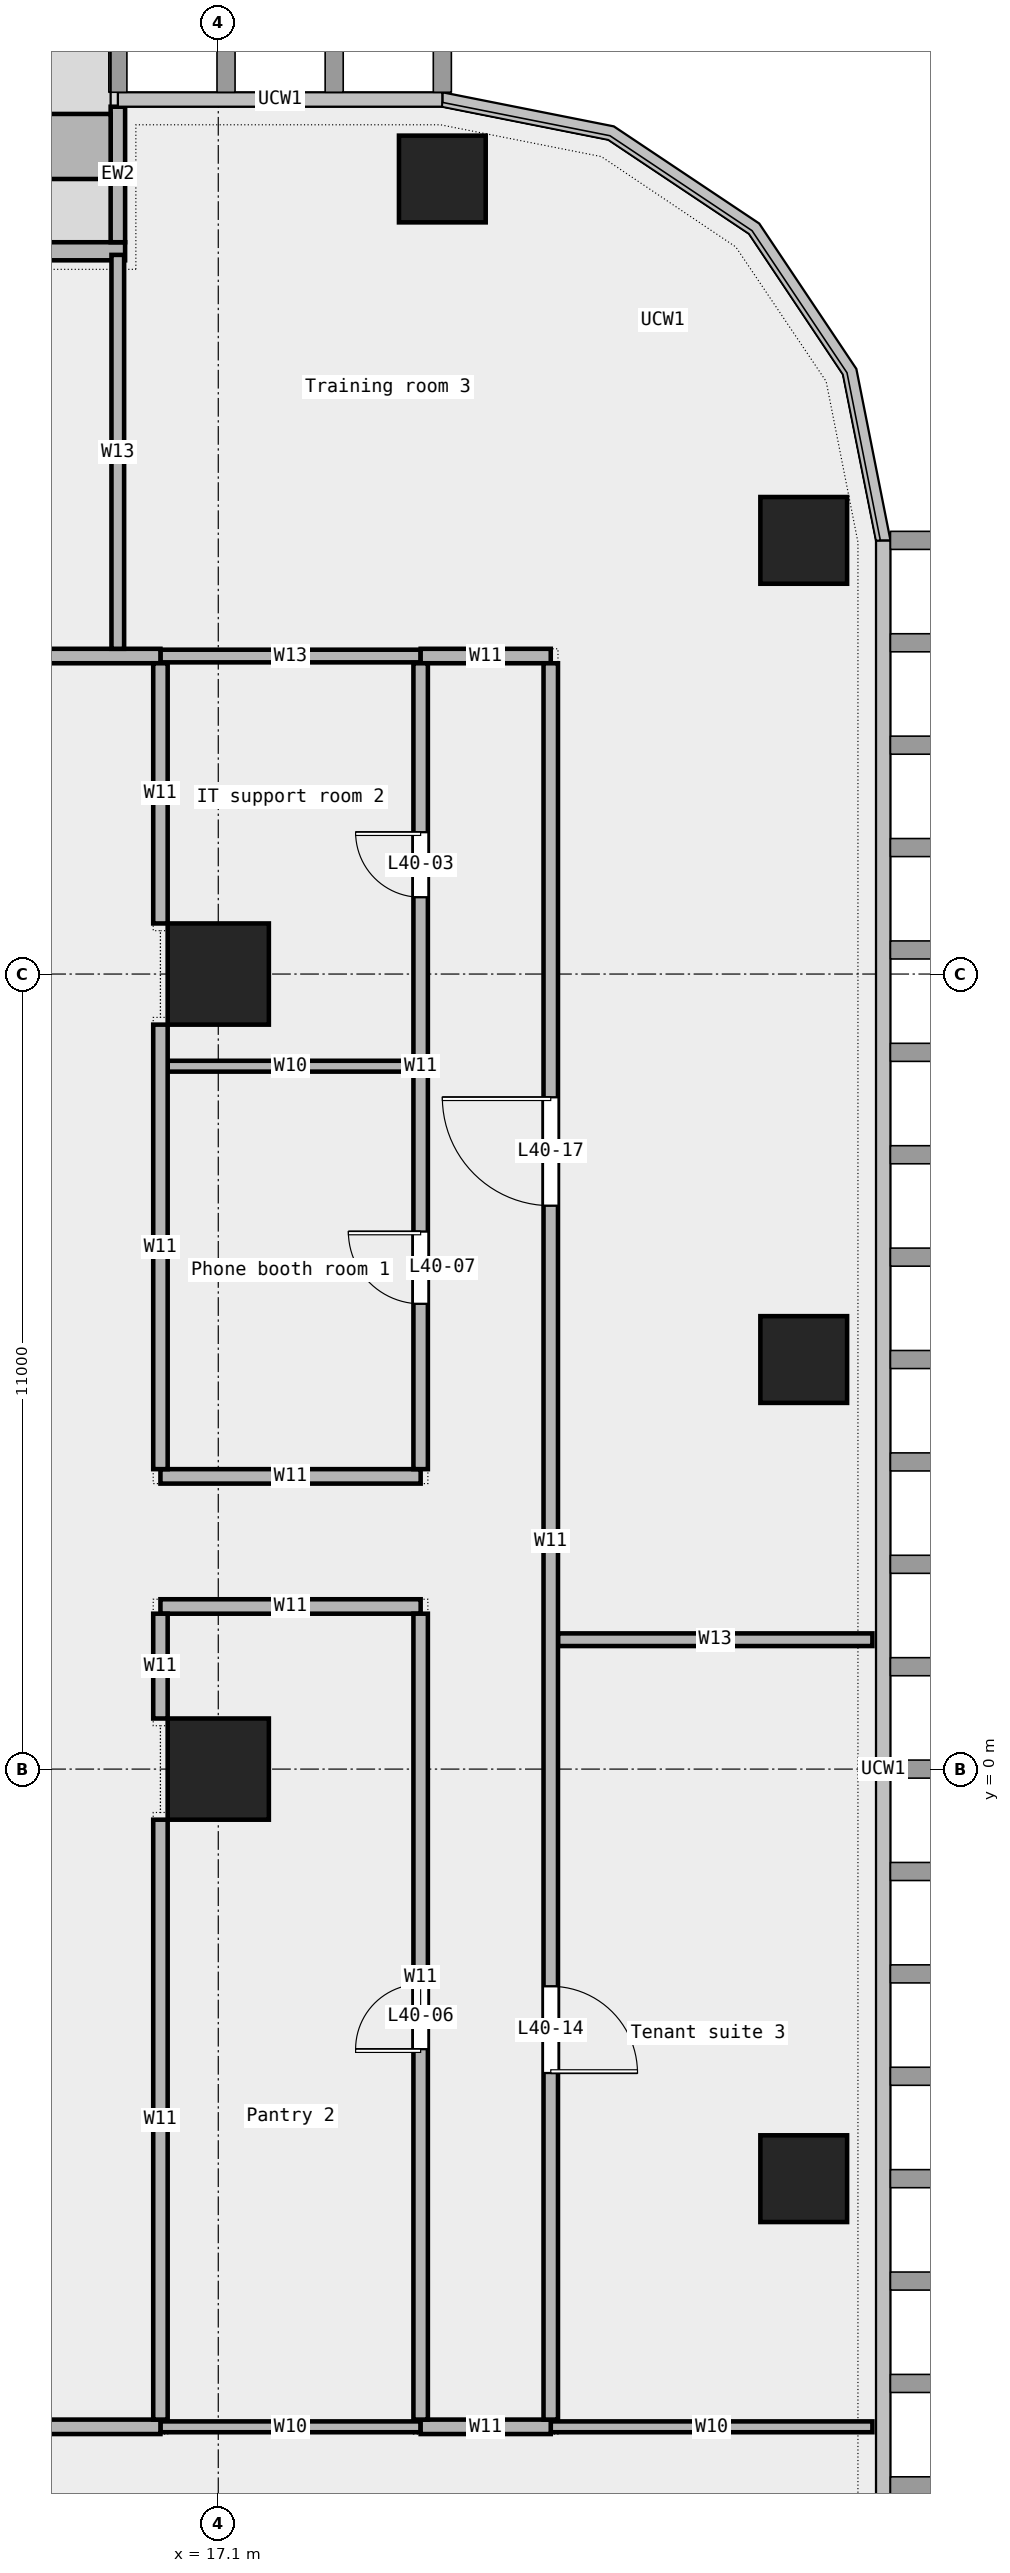
"""IFC4 building model, lengths in metres.
Left out: names, types, materials, properties, quantities, classifications, styles, units other than length and angle.
Written with IfcOpenShell. Run it as: python <this file> out.ifc"""

import sys

from ifc_helpers import new_model, si_unit, direction, frame, frame_2d, origin, origin_2d, place, context, subcontext, project, spatial, rectangle, extrude, element, fill, save


model = new_model("IFC4")
c1 = context("Model", 3, precision=1e-05, world=origin(), true_north=direction((0.0, 1.0)))
c2 = subcontext(c1, "Body", "Model", "MODEL_VIEW")
j1 = project(units=[si_unit("LENGTHUNIT", "METRE"), si_unit("PLANEANGLEUNIT", "RADIAN")], contexts=[c1])
p1 = place(None, origin())
s1 = spatial("IfcSite", under=j1, at=p1, CompositionType="ELEMENT")
p2 = place(p1, origin())
s2 = spatial("IfcBuilding", under=s1, at=p2, CompositionType="ELEMENT")
p3 = place(p2, frame((0.0, 0.0, 193.0)))
s3 = spatial("IfcBuildingStorey", under=s2, at=p3, CompositionType="ELEMENT", Elevation=193.0)
for number, where, z_axis, x_axis in (
    (1, (25.2, -5.667, 0.0), (0.0, 0.0, 1.0), (1.0, 0.0, 0.0)),
    (2, (25.2, 5.667, 0.0), (0.0, 0.0, 1.0), (1.0, 0.0, 0.0)),
    (3, (25.2, 17.0, 0.0), (0.0, 0.0, 1.0), (1.0, 0.0, 0.0)),
    (4, (20.2, 22.0, 0.0), (0.0, 0.0, 1.0), (1.0, 0.0, 0.0)),
):
    element("IfcColumn", number, at=place(p3, frame(where, z_axis=z_axis, x_axis=x_axis)), inside=s3, PredefinedType="COLUMN", context=c2, shape_type="SweptSolid", body=[
        extrude(rectangle(XDim=1.2, YDim=1.2, at=origin_2d()), origin(), (0.0, 0.0, 1.0), 3.6),
    ])
for number, where, z_axis, x_axis in (
    (5, (17.1, 0.0, 0.0), (0.0, 0.0, 1.0), (1.0, 0.0, 0.0)),
    (6, (17.1, 11.0, 0.0), (0.0, 0.0, 1.0), (1.0, 0.0, 0.0)),
):
    element("IfcColumn", number, at=place(p3, frame(where, z_axis=z_axis, x_axis=x_axis)), inside=s3, PredefinedType="COLUMN", context=c2, shape_type="SweptSolid", body=[
        extrude(rectangle(XDim=1.4, YDim=1.4, at=origin_2d()), origin(), (0.0, 0.0, 1.0), 3.6),
    ])
p4 = place(p3, frame((15.811, 21.0, 0.0), z_axis=(0.0, 0.0, 1.0), x_axis=(-1.0, 0.0, 0.0)))
e7 = element("IfcWall", 7, at=p4, inside=s3, PredefinedType="STANDARD", context=c2, shape_type="SweptSolid", body=[
    extrude(rectangle(XDim=13.667, YDim=0.25, at=frame_2d((6.833, 0.0))), origin(), (0.0, 0.0, 1.0), 3.6),
])
p5 = place(p4, frame((1.75, 0.0, 0.45)))
e8 = element("IfcOpeningElement", 8, at=p5, cuts=e7, PredefinedType="OPENING", context=c2, shape_type="SweptSolid", body=[
    extrude(rectangle(XDim=1.5, YDim=2.4, at=frame_2d((0.75, 1.2))), frame((0.0, 0.137, 0.0), z_axis=(0.0, -1.0, 0.0), x_axis=(1.0, 0.0, 0.0)), (0.0, 0.0, 1.0), 0.274),
])
p6 = place(p4, frame((6.75, 0.0, 0.0)))
e9 = element("IfcOpeningElement", 9, at=p6, cuts=e7, PredefinedType="OPENING", context=c2, shape_type="SweptSolid", body=[
    extrude(rectangle(XDim=1.8, YDim=2.4, at=frame_2d((0.9, 1.2))), frame((0.0, 0.137, 0.0), z_axis=(0.0, -1.0, 0.0), x_axis=(1.0, 0.0, 0.0)), (0.0, 0.0, 1.0), 0.274),
])
p7 = place(p4, frame((10.5, 0.0, 0.45)))
e10 = element("IfcOpeningElement", 10, at=p7, cuts=e7, PredefinedType="OPENING", context=c2, shape_type="SweptSolid", body=[
    extrude(rectangle(XDim=1.5, YDim=2.4, at=frame_2d((0.75, 1.2))), frame((0.0, 0.137, 0.0), z_axis=(0.0, -1.0, 0.0), x_axis=(1.0, 0.0, 0.0)), (0.0, 0.0, 1.0), 0.274),
])
p8 = place(p3, frame((15.711, 23.0, 0.0), z_axis=(0.0, 0.0, 1.0), x_axis=(0.0, -1.0, 0.0)))
e11 = element("IfcWall", 11, at=p8, inside=s3, PredefinedType="STANDARD", context=c2, shape_type="SweptSolid", body=[
    extrude(rectangle(XDim=1.875, YDim=0.2, at=frame_2d((0.938, 0.0))), origin(), (0.0, 0.0, 1.0), 3.6),
])
p9 = place(p3, frame((15.611, 22.45, 0.0), z_axis=(0.0, 0.0, 1.0), x_axis=(-1.0, 0.0, 0.0)))
e12 = element("IfcWall", 12, at=p9, inside=s3, PredefinedType="STANDARD", context=c2, shape_type="SweptSolid", body=[
    extrude(rectangle(XDim=3.6, YDim=0.9, at=frame_2d((1.8, 0.0))), origin(), (0.0, 0.0, 1.0), 0.7),
])
p10 = place(p3, frame((16.3, -9.1, 0.0), z_axis=(0.0, 0.0, 1.0), x_axis=(1.0, 0.0, 0.0)))
e13 = element("IfcWall", 13, at=p10, inside=s3, PredefinedType="PARTITIONING", context=c2, shape_type="SweptSolid", body=[
    extrude(rectangle(XDim=3.6, YDim=0.15, at=frame_2d((1.8, 0.0))), origin(), (0.0, 0.0, 1.0), 3.6),
])
p11 = place(p3, frame((21.7, -9.1, 0.0), z_axis=(0.0, 0.0, 1.0), x_axis=(1.0, 0.0, 0.0)))
e14 = element("IfcWall", 14, at=p11, inside=s3, PredefinedType="PARTITIONING", context=c2, shape_type="SweptSolid", body=[
    extrude(rectangle(XDim=4.45, YDim=0.15, at=frame_2d((2.225, 0.0))), origin(), (0.0, 0.0, 1.0), 3.6),
])
p12 = place(p3, frame((4.84, -9.1, 0.0), z_axis=(0.0, 0.0, 1.0), x_axis=(1.0, 0.0, 0.0)))
e15 = element("IfcWall", 15, at=p12, inside=s3, PredefinedType="PARTITIONING", context=c2, shape_type="SweptSolid", body=[
    extrude(rectangle(XDim=11.46, YDim=0.2, at=frame_2d((5.73, 0.0))), origin(), (0.0, 0.0, 1.0), 3.6),
])
p13 = place(p3, frame((19.9, -9.1, 0.0), z_axis=(0.0, 0.0, 1.0), x_axis=(1.0, 0.0, 0.0)))
e16 = element("IfcWall", 16, at=p13, inside=s3, PredefinedType="PARTITIONING", context=c2, shape_type="SweptSolid", body=[
    extrude(rectangle(XDim=1.8, YDim=0.2, at=frame_2d((0.9, 0.0))), origin(), (0.0, 0.0, 1.0), 3.6),
])
p14 = place(p3, frame((21.8, 1.79, 0.0), z_axis=(0.0, 0.0, 1.0), x_axis=(1.0, 0.0, 0.0)))
e17 = element("IfcWall", 17, at=p14, inside=s3, PredefinedType="PARTITIONING", context=c2, shape_type="SweptSolid", body=[
    extrude(rectangle(XDim=4.35, YDim=0.175, at=frame_2d((2.175, 0.0))), origin(), (0.0, 0.0, 1.0), 3.6),
])
for number, where, z_axis, x_axis in (
    (18, (16.3, 2.25, 0.0), (0.0, 0.0, 1.0), (1.0, 0.0, 0.0)),
    (19, (16.3, 4.05, 0.0), (0.0, 0.0, 1.0), (1.0, 0.0, 0.0)),
):
    element("IfcWall", number, at=place(p3, frame(where, z_axis=z_axis, x_axis=x_axis)), inside=s3, PredefinedType="PARTITIONING", context=c2, shape_type="SweptSolid", body=[
        extrude(rectangle(XDim=3.6, YDim=0.2, at=frame_2d((1.8, 0.0))), origin(), (0.0, 0.0, 1.0), 3.6),
    ])
p15 = place(p3, frame((16.4, 9.725, 0.0), z_axis=(0.0, 0.0, 1.0), x_axis=(1.0, 0.0, 0.0)))
e20 = element("IfcWall", 20, at=p15, inside=s3, PredefinedType="PARTITIONING", context=c2, shape_type="SweptSolid", body=[
    extrude(rectangle(XDim=3.4, YDim=0.15, at=frame_2d((1.7, 0.0))), origin(), (0.0, 0.0, 1.0), 3.6),
])
p16 = place(p3, frame((16.3, 15.4, 0.0), z_axis=(0.0, 0.0, 1.0), x_axis=(1.0, 0.0, 0.0)))
e21 = element("IfcWall", 21, at=p16, inside=s3, PredefinedType="PARTITIONING", context=c2, shape_type="SweptSolid", body=[
    extrude(rectangle(XDim=3.6, YDim=0.175, at=frame_2d((1.8, 0.0))), origin(), (0.0, 0.0, 1.0), 3.6),
])
p17 = place(p3, frame((-16.3, 15.4, 0.0), z_axis=(0.0, 0.0, 1.0), x_axis=(1.0, 0.0, 0.0)))
e22 = element("IfcWall", 22, at=p17, inside=s3, PredefinedType="PARTITIONING", context=c2, shape_type="SweptSolid", body=[
    extrude(rectangle(XDim=32.6, YDim=0.2, at=frame_2d((16.3, 0.0))), origin(), (0.0, 0.0, 1.0), 3.6),
])
p18 = place(p17, frame((10.185, 0.0, 0.0)))
e23 = element("IfcOpeningElement", 23, at=p18, cuts=e22, PredefinedType="OPENING", context=c2, shape_type="SweptSolid", body=[
    extrude(rectangle(XDim=1.5, YDim=2.1, at=frame_2d((0.75, 1.05))), frame((0.0, 0.112, 0.0), z_axis=(0.0, -1.0, 0.0), x_axis=(1.0, 0.0, 0.0)), (0.0, 0.0, 1.0), 0.224),
])
p19 = place(p17, frame((1.062, 0.0, 0.0)))
e24 = element("IfcOpeningElement", 24, at=p19, cuts=e22, PredefinedType="OPENING", context=c2, shape_type="SweptSolid", body=[
    extrude(rectangle(XDim=1.2, YDim=2.1, at=frame_2d((0.6, 1.05))), frame((0.0, 0.112, 0.0), z_axis=(0.0, -1.0, 0.0), x_axis=(1.0, 0.0, 0.0)), (0.0, 0.0, 1.0), 0.224),
])
p20 = place(p17, frame((24.677, 0.0, 0.0)))
e25 = element("IfcOpeningElement", 25, at=p20, cuts=e22, PredefinedType="OPENING", context=c2, shape_type="SweptSolid", body=[
    extrude(rectangle(XDim=1.2, YDim=2.1, at=frame_2d((0.6, 1.05))), frame((0.0, 0.112, 0.0), z_axis=(0.0, -1.0, 0.0), x_axis=(1.0, 0.0, 0.0)), (0.0, 0.0, 1.0), 0.224),
])
p21 = place(p3, frame((19.9, 15.4, 0.0), z_axis=(0.0, 0.0, 1.0), x_axis=(1.0, 0.0, 0.0)))
e26 = element("IfcWall", 26, at=p21, inside=s3, PredefinedType="PARTITIONING", context=c2, shape_type="SweptSolid", body=[
    extrude(rectangle(XDim=1.8, YDim=0.2, at=frame_2d((0.9, 0.0))), origin(), (0.0, 0.0, 1.0), 3.6),
])
p22 = place(p3, frame((15.71, 15.5, 0.0), z_axis=(0.0, 0.0, 1.0), x_axis=(0.0, 1.0, 0.0)))
e27 = element("IfcWall", 27, at=p22, inside=s3, PredefinedType="PARTITIONING", context=c2, shape_type="SweptSolid", body=[
    extrude(rectangle(XDim=5.45, YDim=0.175, at=frame_2d((2.725, 0.0))), origin(), (0.0, 0.0, 1.0), 3.6),
])
p23 = place(p3, frame((16.3, -9.0, 0.0), z_axis=(0.0, 0.0, 1.0), x_axis=(0.0, 1.0, 0.0)))
e28 = element("IfcWall", 28, at=p23, inside=s3, PredefinedType="PARTITIONING", context=c2, shape_type="SweptSolid", body=[
    extrude(rectangle(XDim=8.3, YDim=0.2, at=frame_2d((4.15, 0.0))), origin(), (0.0, 0.0, 1.0), 3.6),
])
p24 = place(p3, frame((16.3, 0.7, 0.0), z_axis=(0.0, 0.0, 1.0), x_axis=(0.0, 1.0, 0.0)))
e29 = element("IfcWall", 29, at=p24, inside=s3, PredefinedType="PARTITIONING", context=c2, shape_type="SweptSolid", body=[
    extrude(rectangle(XDim=1.45, YDim=0.2, at=frame_2d((0.725, 0.0))), origin(), (0.0, 0.0, 1.0), 3.6),
])
p25 = place(p3, frame((16.3, 4.15, 0.0), z_axis=(0.0, 0.0, 1.0), x_axis=(0.0, 1.0, 0.0)))
e30 = element("IfcWall", 30, at=p25, inside=s3, PredefinedType="PARTITIONING", context=c2, shape_type="SweptSolid", body=[
    extrude(rectangle(XDim=6.15, YDim=0.2, at=frame_2d((3.075, 0.0))), origin(), (0.0, 0.0, 1.0), 3.6),
])
p26 = place(p3, frame((16.3, 11.7, 0.0), z_axis=(0.0, 0.0, 1.0), x_axis=(0.0, 1.0, 0.0)))
e31 = element("IfcWall", 31, at=p26, inside=s3, PredefinedType="PARTITIONING", context=c2, shape_type="SweptSolid", body=[
    extrude(rectangle(XDim=3.6, YDim=0.2, at=frame_2d((1.8, 0.0))), origin(), (0.0, 0.0, 1.0), 3.6),
])
p27 = place(p3, frame((19.9, -9.0, 0.0), z_axis=(0.0, 0.0, 1.0), x_axis=(0.0, 1.0, 0.0)))
e32 = element("IfcWall", 32, at=p27, inside=s3, PredefinedType="PARTITIONING", context=c2, shape_type="SweptSolid", body=[
    extrude(rectangle(XDim=11.15, YDim=0.2, at=frame_2d((5.575, 0.0))), origin(), (0.0, 0.0, 1.0), 3.6),
])
p28 = place(p27, frame((5.125, 0.0, 0.0)))
e33 = element("IfcOpeningElement", 33, at=p28, cuts=e32, PredefinedType="OPENING", context=c2, shape_type="SweptSolid", body=[
    extrude(rectangle(XDim=0.9, YDim=2.1, at=frame_2d((0.45, 1.05))), frame((0.0, 0.112, 0.0), z_axis=(0.0, -1.0, 0.0), x_axis=(1.0, 0.0, 0.0)), (0.0, 0.0, 1.0), 0.224),
])
p29 = place(p3, frame((19.9, 4.15, 0.0), z_axis=(0.0, 0.0, 1.0), x_axis=(0.0, 1.0, 0.0)))
e34 = element("IfcWall", 34, at=p29, inside=s3, PredefinedType="PARTITIONING", context=c2, shape_type="SweptSolid", body=[
    extrude(rectangle(XDim=11.15, YDim=0.2, at=frame_2d((5.575, 0.0))), origin(), (0.0, 0.0, 1.0), 3.6),
])
p30 = place(p29, frame((7.913, 0.0, 0.0)))
e35 = element("IfcOpeningElement", 35, at=p30, cuts=e34, PredefinedType="OPENING", context=c2, shape_type="SweptSolid", body=[
    extrude(rectangle(XDim=0.9, YDim=2.1, at=frame_2d((0.45, 1.05))), frame((0.0, 0.112, 0.0), z_axis=(0.0, -1.0, 0.0), x_axis=(1.0, 0.0, 0.0)), (0.0, 0.0, 1.0), 0.224),
])
p31 = place(p29, frame((2.288, 0.0, 0.0)))
e36 = element("IfcOpeningElement", 36, at=p31, cuts=e34, PredefinedType="OPENING", context=c2, shape_type="SweptSolid", body=[
    extrude(rectangle(XDim=1.0, YDim=2.1, at=frame_2d((0.5, 1.05))), frame((0.0, 0.112, 0.0), z_axis=(0.0, -1.0, 0.0), x_axis=(1.0, 0.0, 0.0)), (0.0, 0.0, 1.0), 0.224),
])
p32 = place(p3, frame((21.7, -9.0, 0.0), z_axis=(0.0, 0.0, 1.0), x_axis=(0.0, 1.0, 0.0)))
e37 = element("IfcWall", 37, at=p32, inside=s3, PredefinedType="PARTITIONING", context=c2, shape_type="SweptSolid", body=[
    extrude(rectangle(XDim=24.3, YDim=0.2, at=frame_2d((12.15, 0.0))), origin(), (0.0, 0.0, 1.0), 3.6),
])
p33 = place(p32, frame((4.795, 0.0, 0.0)))
e38 = element("IfcOpeningElement", 38, at=p33, cuts=e37, PredefinedType="OPENING", context=c2, shape_type="SweptSolid", body=[
    extrude(rectangle(XDim=1.2, YDim=2.1, at=frame_2d((0.6, 1.05))), frame((0.0, 0.112, 0.0), z_axis=(0.0, -1.0, 0.0), x_axis=(1.0, 0.0, 0.0)), (0.0, 0.0, 1.0), 0.224),
])
p34 = place(p32, frame((16.795, 0.0, 0.0)))
e39 = element("IfcOpeningElement", 39, at=p34, cuts=e37, PredefinedType="OPENING", context=c2, shape_type="SweptSolid", body=[
    extrude(rectangle(XDim=1.5, YDim=2.1, at=frame_2d((0.75, 1.05))), frame((0.0, 0.112, 0.0), z_axis=(0.0, -1.0, 0.0), x_axis=(1.0, 0.0, 0.0)), (0.0, 0.0, 1.0), 0.224),
])
p35 = place(p30, origin())
e40 = element("IfcDoor", 40, at=p35, inside=s3, OperationType="SINGLE_SWING_RIGHT", PredefinedType="DOOR", context=c2, shape_type="SweptSolid", body=[
    extrude(rectangle(XDim=0.9, YDim=2.1, at=frame_2d((0.45, 1.05))), frame((0.0, 0.025, 0.0), z_axis=(0.0, -1.0, 0.0), x_axis=(1.0, 0.0, 0.0)), (0.0, 0.0, 1.0), 0.05),
])
fill(e35, e40)
p36 = place(p28, origin())
e41 = element("IfcDoor", 41, at=p36, inside=s3, OperationType="SINGLE_SWING_LEFT", PredefinedType="DOOR", context=c2, shape_type="SweptSolid", body=[
    extrude(rectangle(XDim=0.9, YDim=2.1, at=frame_2d((0.45, 1.05))), frame((0.0, 0.025, 0.0), z_axis=(0.0, -1.0, 0.0), x_axis=(1.0, 0.0, 0.0)), (0.0, 0.0, 1.0), 0.05),
])
fill(e33, e41)
p37 = place(p31, origin())
e42 = element("IfcDoor", 42, at=p37, inside=s3, OperationType="SINGLE_SWING_RIGHT", PredefinedType="DOOR", context=c2, shape_type="SweptSolid", body=[
    extrude(rectangle(XDim=1.0, YDim=2.1, at=frame_2d((0.5, 1.05))), frame((0.0, 0.025, 0.0), z_axis=(0.0, -1.0, 0.0), x_axis=(1.0, 0.0, 0.0)), (0.0, 0.0, 1.0), 0.05),
])
fill(e36, e42)
p38 = place(p33, origin())
e43 = element("IfcDoor", 43, at=p38, inside=s3, OperationType="SINGLE_SWING_RIGHT", PredefinedType="DOOR", context=c2, shape_type="SweptSolid", body=[
    extrude(rectangle(XDim=1.2, YDim=2.1, at=frame_2d((0.6, 1.05))), frame((0.0, 0.025, 0.0), z_axis=(0.0, -1.0, 0.0), x_axis=(1.0, 0.0, 0.0)), (0.0, 0.0, 1.0), 0.05),
])
fill(e38, e43)
p39 = place(p34, origin())
e44 = element("IfcDoor", 44, at=p39, inside=s3, OperationType="DOUBLE_DOOR_SINGLE_SWING", PredefinedType="DOOR", context=c2, shape_type="SweptSolid", body=[
    extrude(rectangle(XDim=1.5, YDim=2.1, at=frame_2d((0.75, 1.05))), frame((0.0, 0.025, 0.0), z_axis=(0.0, -1.0, 0.0), x_axis=(1.0, 0.0, 0.0)), (0.0, 0.0, 1.0), 0.05),
])
fill(e39, e44)
save(model, sys.argv[1])
